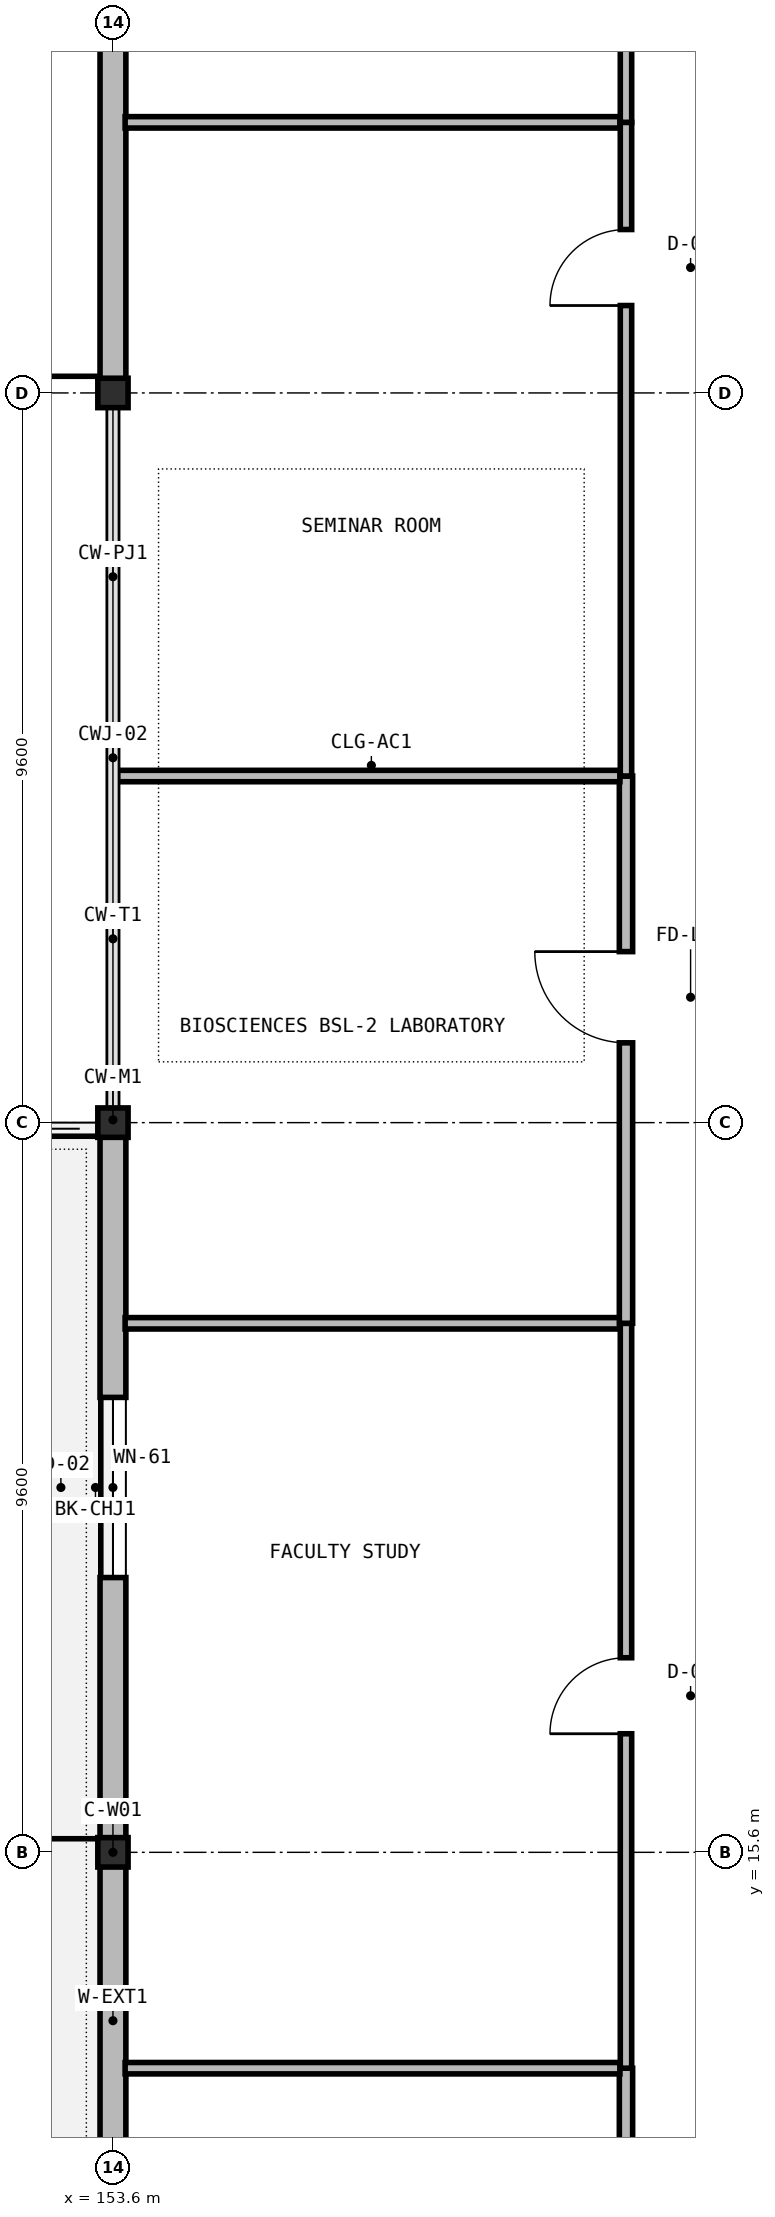
"""IFC4 building model, lengths in metres.
Left out: names, types, materials, properties, quantities, classifications, styles, units other than length and angle.
Written with IfcOpenShell. Run it as: python <this file> out.ifc"""

import sys

from ifc_helpers import new_model, si_unit, direction, frame, frame_2d, origin, origin_2d, place, context, subcontext, project, spatial, rectangle, i_section, extrude, element, fill, save


model = new_model("IFC4")
c1 = context("Model", 3, precision=1e-05, world=origin(), true_north=direction((0.0, 1.0)))
c2 = subcontext(c1, "Body", "Model", "MODEL_VIEW")
j1 = project(units=[si_unit("LENGTHUNIT", "METRE"), si_unit("PLANEANGLEUNIT", "RADIAN")], contexts=[c1])
p1 = place(None, origin())
s1 = spatial("IfcSite", under=j1, at=p1, CompositionType="ELEMENT")
p2 = place(p1, origin())
s2 = spatial("IfcBuilding", under=s1, at=p2, CompositionType="ELEMENT")
p3 = place(p2, frame((0.0, 0.0, 5.25)))
s3 = spatial("IfcBuildingStorey", under=s2, at=p3, CompositionType="ELEMENT", Elevation=5.25)
for number, where, z_axis, x_axis in (
    (1, (153.6, 15.6, 0.0), (0.0, 0.0, 1.0), (1.0, 0.0, 0.0)),
    (2, (153.6, 25.2, 0.0), (0.0, 0.0, 1.0), (1.0, 0.0, 0.0)),
    (3, (153.6, 34.8, 0.0), (0.0, 0.0, 1.0), (1.0, 0.0, 0.0)),
):
    element("IfcColumn", number, at=place(p3, frame(where, z_axis=z_axis, x_axis=x_axis)), inside=s3, PredefinedType="COLUMN", context=c2, shape_type="SweptSolid", body=[
        extrude(i_section(OverallWidth=0.398, OverallDepth=0.387, WebThickness=0.024, FlangeThickness=0.039, at=origin_2d()), origin(), (0.0, 0.0, 1.0), 4.55),
    ])
p4 = place(p3, frame((153.6, 6.174, 0.0), z_axis=(0.0, 0.0, 1.0), x_axis=(0.0, 1.0, 0.0)))
e4 = element("IfcWall", 4, at=p4, inside=s3, PredefinedType="SOLIDWALL", context=c2, shape_type="SweptSolid", body=[
    extrude(rectangle(XDim=9.422, YDim=0.34, at=frame_2d((4.711, 0.0))), origin(), (0.0, 0.0, 1.0), 3.893),
])
p5 = place(p4, frame((3.6, 0.0, 0.0)))
e5 = element("IfcOpeningElement", 5, at=p5, cuts=e4, PredefinedType="OPENING", context=c2, shape_type="SweptSolid", body=[
    extrude(rectangle(XDim=1.4, YDim=2.2, at=frame_2d((0.7, 1.1))), frame((0.0, 0.18, 0.0), z_axis=(0.0, -1.0, 0.0), x_axis=(1.0, 0.0, 0.0)), (0.0, 0.0, 1.0), 0.36),
])
p6 = place(p3, frame((153.6, 15.604, 0.0), z_axis=(0.0, 0.0, 1.0), x_axis=(0.0, 1.0, 0.0)))
e6 = element("IfcWall", 6, at=p6, inside=s3, PredefinedType="SOLIDWALL", context=c2, shape_type="SweptSolid", body=[
    extrude(rectangle(XDim=9.592, YDim=0.34, at=frame_2d((4.796, 0.0))), origin(), (0.0, 0.0, 1.0), 3.893),
])
p7 = place(p6, frame((3.611, 0.0, 0.95)))
e7 = element("IfcOpeningElement", 7, at=p7, cuts=e6, PredefinedType="OPENING", context=c2, shape_type="SweptSolid", body=[
    extrude(rectangle(XDim=2.37, YDim=1.48, at=frame_2d((1.185, 0.74))), frame((0.0, 0.18, 0.0), z_axis=(0.0, -1.0, 0.0), x_axis=(1.0, 0.0, 0.0)), (0.0, 0.0, 1.0), 0.36),
])
p8 = place(p3, frame((153.6, 34.804, 0.0), z_axis=(0.0, 0.0, 1.0), x_axis=(0.0, 1.0, 0.0)))
e8 = element("IfcWall", 8, at=p8, inside=s3, PredefinedType="SOLIDWALL", context=c2, shape_type="SweptSolid", body=[
    extrude(rectangle(XDim=9.592, YDim=0.34, at=frame_2d((4.796, 0.0))), origin(), (0.0, 0.0, 1.0), 3.893),
])
p9 = place(p3, frame((160.35, 6.16, 0.0), z_axis=(0.0, 0.0, 1.0), x_axis=(0.0, 1.0, 0.0)))
e9 = element("IfcWall", 9, at=p9, inside=s3, PredefinedType="PARTITIONING", context=c2, shape_type="SweptSolid", body=[
    extrude(rectangle(XDim=6.6, YDim=0.175, at=frame_2d((3.3, 0.0))), origin(), (0.0, 0.0, 1.0), 4.23),
])
p10 = place(p9, frame((2.7, 0.0, 0.0)))
e10 = element("IfcOpeningElement", 10, at=p10, cuts=e9, PredefinedType="OPENING", context=c2, shape_type="SweptSolid", body=[
    extrude(rectangle(XDim=1.2, YDim=2.2, at=frame_2d((0.6, 1.1))), frame((0.0, 0.097, 0.0), z_axis=(0.0, -1.0, 0.0), x_axis=(1.0, 0.0, 0.0)), (0.0, 0.0, 1.0), 0.195),
])
p11 = place(p3, frame((153.76, 12.76, 0.0), z_axis=(0.0, 0.0, 1.0), x_axis=(1.0, 0.0, 0.0)))
e11 = element("IfcWall", 11, at=p11, inside=s3, PredefinedType="PARTITIONING", context=c2, shape_type="SweptSolid", body=[
    extrude(rectangle(XDim=6.51, YDim=0.15, at=frame_2d((3.255, 0.0))), origin(), (0.0, 0.0, 1.0), 4.23),
])
p12 = place(p3, frame((160.35, 12.76, 0.0), z_axis=(0.0, 0.0, 1.0), x_axis=(0.0, 1.0, 0.0)))
e12 = element("IfcWall", 12, at=p12, inside=s3, PredefinedType="PARTITIONING", context=c2, shape_type="SweptSolid", body=[
    extrude(rectangle(XDim=9.8, YDim=0.15, at=frame_2d((4.9, 0.0))), origin(), (0.0, 0.0, 1.0), 4.23),
])
p13 = place(p12, frame((4.4, 0.0, 0.0)))
e13 = element("IfcOpeningElement", 13, at=p13, cuts=e12, PredefinedType="OPENING", context=c2, shape_type="SweptSolid", body=[
    extrude(rectangle(XDim=1.0, YDim=2.2, at=frame_2d((0.5, 1.1))), frame((0.0, 0.085, 0.0), z_axis=(0.0, -1.0, 0.0), x_axis=(1.0, 0.0, 0.0)), (0.0, 0.0, 1.0), 0.17),
])
p14 = place(p3, frame((153.76, 22.56, 0.0), z_axis=(0.0, 0.0, 1.0), x_axis=(1.0, 0.0, 0.0)))
e14 = element("IfcWall", 14, at=p14, inside=s3, PredefinedType="PARTITIONING", context=c2, shape_type="SweptSolid", body=[
    extrude(rectangle(XDim=6.51, YDim=0.15, at=frame_2d((3.255, 0.0))), origin(), (0.0, 0.0, 1.0), 4.23),
])
p15 = place(p3, frame((160.35, 22.56, 0.0), z_axis=(0.0, 0.0, 1.0), x_axis=(0.0, 1.0, 0.0)))
e15 = element("IfcWall", 15, at=p15, inside=s3, PredefinedType="PARTITIONING", context=c2, shape_type="SweptSolid", body=[
    extrude(rectangle(XDim=7.2, YDim=0.175, at=frame_2d((3.6, 0.0))), origin(), (0.0, 0.0, 1.0), 4.23),
])
p16 = place(p15, frame((3.69, 0.0, 0.0)))
e16 = element("IfcOpeningElement", 16, at=p16, cuts=e15, PredefinedType="OPENING", context=c2, shape_type="SweptSolid", body=[
    extrude(rectangle(XDim=1.2, YDim=2.2, at=frame_2d((0.6, 1.1))), frame((0.0, 0.097, 0.0), z_axis=(0.0, -1.0, 0.0), x_axis=(1.0, 0.0, 0.0)), (0.0, 0.0, 1.0), 0.195),
])
p17 = place(p3, frame((153.66, 29.76, 0.0), z_axis=(0.0, 0.0, 1.0), x_axis=(1.0, 0.0, 0.0)))
e17 = element("IfcWall", 17, at=p17, inside=s3, PredefinedType="PARTITIONING", context=c2, shape_type="SweptSolid", body=[
    extrude(rectangle(XDim=6.61, YDim=0.15, at=frame_2d((3.305, 0.0))), origin(), (0.0, 0.0, 1.0), 4.23),
])
p18 = place(p3, frame((160.35, 29.76, 0.0), z_axis=(0.0, 0.0, 1.0), x_axis=(0.0, 1.0, 0.0)))
e18 = element("IfcWall", 18, at=p18, inside=s3, PredefinedType="PARTITIONING", context=c2, shape_type="SweptSolid", body=[
    extrude(rectangle(XDim=8.6, YDim=0.15, at=frame_2d((4.3, 0.0))), origin(), (0.0, 0.0, 1.0), 4.23),
])
p19 = place(p18, frame((6.19, 0.0, 0.0)))
e19 = element("IfcOpeningElement", 19, at=p19, cuts=e18, PredefinedType="OPENING", context=c2, shape_type="SweptSolid", body=[
    extrude(rectangle(XDim=1.0, YDim=2.2, at=frame_2d((0.5, 1.1))), frame((0.0, 0.085, 0.0), z_axis=(0.0, -1.0, 0.0), x_axis=(1.0, 0.0, 0.0)), (0.0, 0.0, 1.0), 0.17),
])
p20 = place(p3, frame((153.76, 38.36, 0.0), z_axis=(0.0, 0.0, 1.0), x_axis=(1.0, 0.0, 0.0)))
e20 = element("IfcWall", 20, at=p20, inside=s3, PredefinedType="PARTITIONING", context=c2, shape_type="SweptSolid", body=[
    extrude(rectangle(XDim=6.51, YDim=0.15, at=frame_2d((3.255, 0.0))), origin(), (0.0, 0.0, 1.0), 4.23),
])
p21 = place(p3, frame((160.35, 38.36, 0.0), z_axis=(0.0, 0.0, 1.0), x_axis=(0.0, 1.0, 0.0)))
e21 = element("IfcWall", 21, at=p21, inside=s3, PredefinedType="PARTITIONING", context=c2, shape_type="SweptSolid", body=[
    extrude(rectangle(XDim=6.6, YDim=0.15, at=frame_2d((3.3, 0.0))), origin(), (0.0, 0.0, 1.0), 4.23),
])
p22 = place(p21, frame((2.8, 0.0, 0.0)))
e22 = element("IfcOpeningElement", 22, at=p22, cuts=e21, PredefinedType="OPENING", context=c2, shape_type="SweptSolid", body=[
    extrude(rectangle(XDim=1.0, YDim=2.2, at=frame_2d((0.5, 1.1))), frame((0.0, 0.085, 0.0), z_axis=(0.0, -1.0, 0.0), x_axis=(1.0, 0.0, 0.0)), (0.0, 0.0, 1.0), 0.17),
])
p23 = place(p7, origin())
e23 = element("IfcWindow", 23, at=p23, inside=s3, PartitioningType="SINGLE_PANEL", PredefinedType="WINDOW", context=c2, shape_type="SweptSolid", body=[
    extrude(rectangle(XDim=2.37, YDim=1.48, at=frame_2d((1.185, 0.74))), frame((0.0, 0.03, 0.0), z_axis=(0.0, -1.0, 0.0), x_axis=(1.0, 0.0, 0.0)), (0.0, 0.0, 1.0), 0.06),
])
fill(e7, e23)
p24 = place(p13, origin())
e24 = element("IfcDoor", 24, at=p24, inside=s3, OperationType="SINGLE_SWING_LEFT", PredefinedType="DOOR", context=c2, shape_type="SweptSolid", body=[
    extrude(rectangle(XDim=1.0, YDim=2.2, at=frame_2d((0.5, 1.1))), frame((0.0, 0.025, 0.0), z_axis=(0.0, -1.0, 0.0), x_axis=(1.0, 0.0, 0.0)), (0.0, 0.0, 1.0), 0.05),
])
fill(e13, e24)
p25 = place(p16, origin())
e25 = element("IfcDoor", 25, at=p25, inside=s3, OperationType="SINGLE_SWING_RIGHT", PredefinedType="DOOR", context=c2, shape_type="SweptSolid", body=[
    extrude(rectangle(XDim=1.2, YDim=2.2, at=frame_2d((0.6, 1.1))), frame((0.0, 0.025, 0.0), z_axis=(0.0, -1.0, 0.0), x_axis=(1.0, 0.0, 0.0)), (0.0, 0.0, 1.0), 0.05),
])
fill(e16, e25)
p26 = place(p19, origin())
e26 = element("IfcDoor", 26, at=p26, inside=s3, OperationType="SINGLE_SWING_LEFT", PredefinedType="DOOR", context=c2, shape_type="SweptSolid", body=[
    extrude(rectangle(XDim=1.0, YDim=2.2, at=frame_2d((0.5, 1.1))), frame((0.0, 0.025, 0.0), z_axis=(0.0, -1.0, 0.0), x_axis=(1.0, 0.0, 0.0)), (0.0, 0.0, 1.0), 0.05),
])
fill(e19, e26)
save(model, sys.argv[1])
